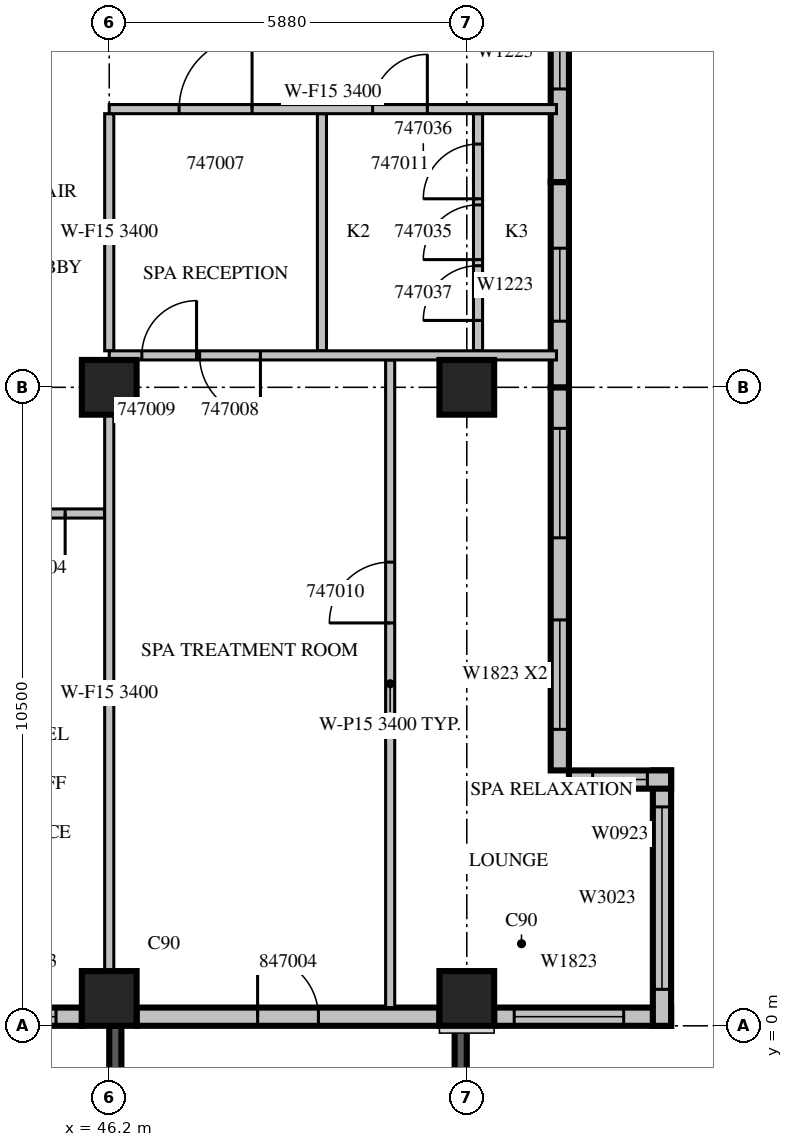
"""IFC4 building model, lengths in metres.
Left out: names, types, materials, properties, quantities, classifications, styles, units other than length and angle.
Written with IfcOpenShell. Run it as: python <this file> out.ifc"""

import sys

from ifc_helpers import new_model, si_unit, direction, frame, frame_2d, origin, origin_2d, place, context, subcontext, project, spatial, rectangle, extrude, source, transform, mapped, element, fill, save


model = new_model("IFC4")
c1 = context("Model", 3, precision=1e-05, world=origin(), true_north=direction((0.0, 1.0)))
c2 = subcontext(c1, "Body", "Model", "MODEL_VIEW")
j1 = project(units=[si_unit("LENGTHUNIT", "METRE"), si_unit("PLANEANGLEUNIT", "RADIAN")], contexts=[c1])
p1 = place(None, origin())
s1 = spatial("IfcSite", under=j1, at=p1, CompositionType="ELEMENT")
p2 = place(p1, origin())
s2 = spatial("IfcBuilding", under=s1, at=p2, CompositionType="ELEMENT")
p3 = place(p2, frame((0.0, 0.0, 212.0)))
s3 = spatial("IfcBuildingStorey", under=s2, at=p3, CompositionType="ELEMENT", Elevation=212.0)
m1 = source(origin(), c2, "Body", "SweptSolid", [
    extrude(rectangle(XDim=0.9, YDim=0.9, at=origin_2d()), origin(), (0.0, 0.0, 1.0), 3.8),
])
for number, where, z_axis, x_axis in (
    (1, (46.2, 0.45, 0.0), (0.0, 0.0, 1.0), (1.0, 0.0, 0.0)),
    (2, (52.08, 0.45, 0.0), (0.0, 0.0, 1.0), (1.0, 0.0, 0.0)),
    (3, (46.2, 10.5, 0.0), (0.0, 0.0, 1.0), (1.0, 0.0, 0.0)),
    (4, (52.08, 10.5, 0.0), (0.0, 0.0, 1.0), (1.0, 0.0, 0.0)),
):
    element("IfcColumn", number, at=place(p3, frame(where, z_axis=z_axis, x_axis=x_axis)), inside=s3, PredefinedType="COLUMN", context=c2, shape_type="MappedRepresentation", body=[
        mapped(m1, transform((0.0, 0.0, 0.0), scale=1.0)),
    ])
m2 = source(origin(), c2, "Body", "SweptSolid", [
    extrude(rectangle(XDim=1.75, YDim=0.3, at=frame_2d((0.875, 0.0))), origin(), (0.0, 0.0, 1.0), 3.4),
])
p4 = place(p3, frame((44.0, 0.15, 0.0), z_axis=(0.0, 0.0, 1.0), x_axis=(1.0, 0.0, 0.0)))
e5 = element("IfcWall", 5, at=p4, inside=s3, PredefinedType="STANDARD", context=c2, shape_type="MappedRepresentation", body=[
    mapped(m2, transform((0.0, 0.0, 0.0), scale=1.0)),
])
m3 = source(origin(), c2, "Body", "SweptSolid", [
    extrude(rectangle(XDim=0.9, YDim=2.3, at=frame_2d((0.45, 1.15))), frame((0.0, 0.16, 0.0), z_axis=(0.0, -1.0, 0.0), x_axis=(1.0, 0.0, 0.0)), (0.0, 0.0, 1.0), 0.32),
])
p5 = place(p4, frame((0.425, 0.0, 0.6)))
e6 = element("IfcOpeningElement", 6, at=p5, cuts=e5, PredefinedType="OPENING", context=c2, shape_type="MappedRepresentation", body=[
    mapped(m3, transform((0.0, 0.0, 0.0), scale=1.0)),
])
m4 = source(origin(), c2, "Body", "SweptSolid", [
    extrude(rectangle(XDim=4.98, YDim=0.3, at=frame_2d((2.49, 0.0))), origin(), (0.0, 0.0, 1.0), 3.4),
])
p6 = place(p3, frame((46.65, 0.15, 0.0), z_axis=(0.0, 0.0, 1.0), x_axis=(1.0, 0.0, 0.0)))
e7 = element("IfcWall", 7, at=p6, inside=s3, PredefinedType="STANDARD", context=c2, shape_type="MappedRepresentation", body=[
    mapped(m4, transform((0.0, 0.0, 0.0), scale=1.0)),
])
m5 = source(origin(), c2, "Body", "SweptSolid", [
    extrude(rectangle(XDim=1.0, YDim=2.1, at=frame_2d((0.5, 1.05))), frame((0.0, 0.16, 0.0), z_axis=(0.0, -1.0, 0.0), x_axis=(1.0, 0.0, 0.0)), (0.0, 0.0, 1.0), 0.32),
])
p7 = place(p6, frame((1.99, 0.0, 0.0)))
e8 = element("IfcOpeningElement", 8, at=p7, cuts=e7, PredefinedType="OPENING", context=c2, shape_type="MappedRepresentation", body=[
    mapped(m5, transform((0.0, 0.0, 0.0), scale=1.0)),
])
m6 = source(origin(), c2, "Body", "SweptSolid", [
    extrude(rectangle(XDim=2.91, YDim=0.3, at=frame_2d((1.455, 0.0))), origin(), (0.0, 0.0, 1.0), 3.4),
])
p8 = place(p3, frame((52.53, 0.15, 0.0), z_axis=(0.0, 0.0, 1.0), x_axis=(1.0, 0.0, 0.0)))
e9 = element("IfcWall", 9, at=p8, inside=s3, PredefinedType="STANDARD", context=c2, shape_type="MappedRepresentation", body=[
    mapped(m6, transform((0.0, 0.0, 0.0), scale=1.0)),
])
m7 = source(origin(), c2, "Body", "SweptSolid", [
    extrude(rectangle(XDim=1.8, YDim=2.3, at=frame_2d((0.9, 1.15))), frame((0.0, 0.16, 0.0), z_axis=(0.0, -1.0, 0.0), x_axis=(1.0, 0.0, 0.0)), (0.0, 0.0, 1.0), 0.32),
])
p9 = place(p8, frame((0.33, 0.0, 0.6)))
e10 = element("IfcOpeningElement", 10, at=p9, cuts=e9, PredefinedType="OPENING", context=c2, shape_type="MappedRepresentation", body=[
    mapped(m7, transform((0.0, 0.0, 0.0), scale=1.0)),
])
m8 = source(origin(), c2, "Body", "SweptSolid", [
    extrude(rectangle(XDim=4.2, YDim=0.3, at=frame_2d((2.1, 0.0))), origin(), (0.0, 0.0, 1.0), 3.4),
])
p10 = place(p3, frame((55.29, 0.0, 0.0), z_axis=(0.0, 0.0, 1.0), x_axis=(0.0, 1.0, 0.0)))
e11 = element("IfcWall", 11, at=p10, inside=s3, PredefinedType="STANDARD", context=c2, shape_type="MappedRepresentation", body=[
    mapped(m8, transform((0.0, 0.0, 0.0), scale=1.0)),
])
m9 = source(origin(), c2, "Body", "SweptSolid", [
    extrude(rectangle(XDim=3.0, YDim=2.3, at=frame_2d((1.5, 1.15))), frame((0.0, 0.16, 0.0), z_axis=(0.0, -1.0, 0.0), x_axis=(1.0, 0.0, 0.0)), (0.0, 0.0, 1.0), 0.32),
])
p11 = place(p10, frame((0.6, 0.0, 0.6)))
e12 = element("IfcOpeningElement", 12, at=p11, cuts=e11, PredefinedType="OPENING", context=c2, shape_type="MappedRepresentation", body=[
    mapped(m9, transform((0.0, 0.0, 0.0), scale=1.0)),
])
m10 = source(origin(), c2, "Body", "SweptSolid", [
    extrude(rectangle(XDim=1.68, YDim=0.3, at=frame_2d((0.84, 0.0))), origin(), (0.0, 0.0, 1.0), 3.4),
])
p12 = place(p3, frame((55.44, 4.05, 0.0), z_axis=(0.0, 0.0, 1.0), x_axis=(-1.0, 0.0, 0.0)))
e13 = element("IfcWall", 13, at=p12, inside=s3, PredefinedType="STANDARD", context=c2, shape_type="MappedRepresentation", body=[
    mapped(m10, transform((0.0, 0.0, 0.0), scale=1.0)),
])
p13 = place(p12, frame((0.39, 0.0, 0.6)))
e14 = element("IfcOpeningElement", 14, at=p13, cuts=e13, PredefinedType="OPENING", context=c2, shape_type="MappedRepresentation", body=[
    mapped(m3, transform((0.0, 0.0, 0.0), scale=1.0)),
])
m11 = source(origin(), c2, "Body", "SweptSolid", [
    extrude(rectangle(XDim=6.3, YDim=0.3, at=frame_2d((3.15, 0.0))), origin(), (0.0, 0.0, 1.0), 3.4),
])
p14 = place(p3, frame((53.61, 4.2, 0.0), z_axis=(0.0, 0.0, 1.0), x_axis=(0.0, 1.0, 0.0)))
e15 = element("IfcWall", 15, at=p14, inside=s3, PredefinedType="STANDARD", context=c2, shape_type="MappedRepresentation", body=[
    mapped(m11, transform((0.0, 0.0, 0.0), scale=1.0)),
])
p15 = place(p14, frame((0.675, 0.0, 0.6)))
e16 = element("IfcOpeningElement", 16, at=p15, cuts=e15, PredefinedType="OPENING", context=c2, shape_type="MappedRepresentation", body=[
    mapped(m7, transform((0.0, 0.0, 0.0), scale=1.0)),
])
p16 = place(p14, frame((3.825, 0.0, 0.6)))
e17 = element("IfcOpeningElement", 17, at=p16, cuts=e15, PredefinedType="OPENING", context=c2, shape_type="MappedRepresentation", body=[
    mapped(m7, transform((0.0, 0.0, 0.0), scale=1.0)),
])
m12 = source(origin(), c2, "Body", "SweptSolid", [
    extrude(rectangle(XDim=3.375, YDim=0.3, at=frame_2d((1.688, 0.0))), origin(), (0.0, 0.0, 1.0), 3.4),
])
p17 = place(p3, frame((53.61, 10.5, 0.0), z_axis=(0.0, 0.0, 1.0), x_axis=(0.0, 1.0, 0.0)))
e18 = element("IfcWall", 18, at=p17, inside=s3, PredefinedType="STANDARD", context=c2, shape_type="MappedRepresentation", body=[
    mapped(m12, transform((0.0, 0.0, 0.0), scale=1.0)),
])
m13 = source(origin(), c2, "Body", "SweptSolid", [
    extrude(rectangle(XDim=1.2, YDim=2.3, at=frame_2d((0.6, 1.15))), frame((0.0, 0.16, 0.0), z_axis=(0.0, -1.0, 0.0), x_axis=(1.0, 0.0, 0.0)), (0.0, 0.0, 1.0), 0.32),
])
p18 = place(p17, frame((1.087, 0.0, 0.6)))
e19 = element("IfcOpeningElement", 19, at=p18, cuts=e18, PredefinedType="OPENING", context=c2, shape_type="MappedRepresentation", body=[
    mapped(m13, transform((0.0, 0.0, 0.0), scale=1.0)),
])
p19 = place(p3, frame((53.61, 13.875, 0.0), z_axis=(0.0, 0.0, 1.0), x_axis=(0.0, 1.0, 0.0)))
e20 = element("IfcWall", 20, at=p19, inside=s3, PredefinedType="STANDARD", context=c2, shape_type="MappedRepresentation", body=[
    mapped(m12, transform((0.0, 0.0, 0.0), scale=1.0)),
])
p20 = place(p19, frame((1.531, 0.0, 0.6)))
e21 = element("IfcOpeningElement", 21, at=p20, cuts=e20, PredefinedType="OPENING", context=c2, shape_type="MappedRepresentation", body=[
    mapped(m13, transform((0.0, 0.0, 0.0), scale=1.0)),
])
m14 = source(origin(), c2, "Body", "SweptSolid", [
    extrude(rectangle(XDim=3.9, YDim=0.2, at=frame_2d((1.95, 0.0))), origin(), (0.0, 0.0, 1.0), 3.39),
])
p21 = place(p3, frame((46.3, 0.0, 0.0), z_axis=(0.0, 0.0, 1.0), x_axis=(0.0, -1.0, 0.0)))
e22 = element("IfcWall", 22, at=p21, inside=s3, PredefinedType="SOLIDWALL", context=c2, shape_type="MappedRepresentation", body=[
    mapped(m14, transform((0.0, 0.0, 0.0), scale=1.0)),
])
m15 = source(origin(), c2, "Body", "SweptSolid", [
    extrude(rectangle(XDim=2.4, YDim=2.3, at=frame_2d((1.2, 1.15))), frame((0.0, 0.11, 0.0), z_axis=(0.0, -1.0, 0.0), x_axis=(1.0, 0.0, 0.0)), (0.0, 0.0, 1.0), 0.22),
])
p22 = place(p21, frame((0.75, 0.0, 0.6)))
e23 = element("IfcOpeningElement", 23, at=p22, cuts=e22, PredefinedType="OPENING", context=c2, shape_type="MappedRepresentation", body=[
    mapped(m15, transform((0.0, 0.0, 0.0), scale=1.0)),
])
p23 = place(p3, frame((51.98, 0.0, 0.0), z_axis=(0.0, 0.0, 1.0), x_axis=(0.0, -1.0, 0.0)))
e24 = element("IfcWall", 24, at=p23, inside=s3, PredefinedType="SOLIDWALL", context=c2, shape_type="MappedRepresentation", body=[
    mapped(m14, transform((0.0, 0.0, 0.0), scale=1.0)),
])
p24 = place(p23, frame((0.75, 0.0, 0.6)))
e25 = element("IfcOpeningElement", 25, at=p24, cuts=e24, PredefinedType="OPENING", context=c2, shape_type="MappedRepresentation", body=[
    mapped(m15, transform((0.0, 0.0, 0.0), scale=1.0)),
])
m16 = source(origin(), c2, "Body", "SweptSolid", [
    extrude(rectangle(XDim=2.2, YDim=0.15, at=frame_2d((1.1, 0.0))), origin(), (0.0, 0.0, 1.0), 3.4),
])
p25 = place(p3, frame((46.125, 8.425, 0.0), z_axis=(0.0, 0.0, 1.0), x_axis=(-1.0, 0.0, 0.0)))
e26 = element("IfcWall", 26, at=p25, inside=s3, PredefinedType="PARTITIONING", context=c2, shape_type="MappedRepresentation", body=[
    mapped(m16, transform((0.0, 0.0, 0.0), scale=1.0)),
])
m17 = source(origin(), c2, "Body", "SweptSolid", [
    extrude(rectangle(XDim=0.9, YDim=2.1, at=frame_2d((0.45, 1.05))), frame((0.0, 0.085, 0.0), z_axis=(0.0, -1.0, 0.0), x_axis=(1.0, 0.0, 0.0)), (0.0, 0.0, 1.0), 0.17),
])
p26 = place(p25, frame((0.65, 0.0, 0.0)))
e27 = element("IfcOpeningElement", 27, at=p26, cuts=e26, PredefinedType="OPENING", context=c2, shape_type="MappedRepresentation", body=[
    mapped(m17, transform((0.0, 0.0, 0.0), scale=1.0)),
])
m18 = source(origin(), c2, "Body", "SweptSolid", [
    extrude(rectangle(XDim=10.65, YDim=0.15, at=frame_2d((5.325, 0.0))), origin(), (0.0, 0.0, 1.0), 3.4),
])
p27 = place(p3, frame((50.82, 0.3, 0.0), z_axis=(0.0, 0.0, 1.0), x_axis=(0.0, 1.0, 0.0)))
e28 = element("IfcWall", 28, at=p27, inside=s3, PredefinedType="PARTITIONING", context=c2, shape_type="MappedRepresentation", body=[
    mapped(m18, transform((0.0, 0.0, 0.0), scale=1.0)),
])
m19 = source(origin(), c2, "Body", "SweptSolid", [
    extrude(rectangle(XDim=1.0, YDim=2.1, at=frame_2d((0.5, 1.05))), frame((0.0, 0.085, 0.0), z_axis=(0.0, -1.0, 0.0), x_axis=(1.0, 0.0, 0.0)), (0.0, 0.0, 1.0), 0.17),
])
p28 = place(p27, frame((6.325, 0.0, 0.0)))
e29 = element("IfcOpeningElement", 29, at=p28, cuts=e28, PredefinedType="OPENING", context=c2, shape_type="MappedRepresentation", body=[
    mapped(m19, transform((0.0, 0.0, 0.0), scale=1.0)),
])
m20 = source(origin(), c2, "Body", "SweptSolid", [
    extrude(rectangle(XDim=3.9, YDim=0.15, at=frame_2d((1.95, 0.0))), origin(), (0.0, 0.0, 1.0), 3.4),
])
p29 = place(p3, frame((49.698, 11.1, 0.0), z_axis=(0.0, 0.0, 1.0), x_axis=(0.0, 1.0, 0.0)))
e30 = element("IfcWall", 30, at=p29, inside=s3, PredefinedType="PARTITIONING", context=c2, shape_type="MappedRepresentation", body=[
    mapped(m20, transform((0.0, 0.0, 0.0), scale=1.0)),
])
p30 = place(p3, frame((52.265, 11.1, 0.0), z_axis=(0.0, 0.0, 1.0), x_axis=(0.0, 1.0, 0.0)))
e31 = element("IfcWall", 31, at=p30, inside=s3, PredefinedType="PARTITIONING", context=c2, shape_type="MappedRepresentation", body=[
    mapped(m20, transform((0.0, 0.0, 0.0), scale=1.0)),
])
p31 = place(p30, frame((1.5, 0.0, 0.0)))
e32 = element("IfcOpeningElement", 32, at=p31, cuts=e31, PredefinedType="OPENING", context=c2, shape_type="MappedRepresentation", body=[
    mapped(m17, transform((0.0, 0.0, 0.0), scale=1.0)),
])
p32 = place(p30, frame((2.5, 0.0, 0.0)))
e33 = element("IfcOpeningElement", 33, at=p32, cuts=e31, PredefinedType="OPENING", context=c2, shape_type="MappedRepresentation", body=[
    mapped(m17, transform((0.0, 0.0, 0.0), scale=1.0)),
])
p33 = place(p30, frame((0.5, 0.0, 0.0)))
e34 = element("IfcOpeningElement", 34, at=p33, cuts=e31, PredefinedType="OPENING", context=c2, shape_type="MappedRepresentation", body=[
    mapped(m17, transform((0.0, 0.0, 0.0), scale=1.0)),
])
m21 = source(origin(), c2, "Body", "SweptSolid", [
    extrude(rectangle(XDim=9.152, YDim=0.15, at=frame_2d((4.576, 0.0))), origin(), (0.0, 0.0, 1.0), 3.4),
])
p34 = place(p3, frame((46.2, 0.899, 0.0), z_axis=(0.0, 0.0, 1.0), x_axis=(0.0, 1.0, 0.0)))
e35 = element("IfcWall", 35, at=p34, inside=s3, PredefinedType="PARTITIONING", context=c2, shape_type="MappedRepresentation", body=[
    mapped(m21, transform((0.0, 0.0, 0.0), scale=1.0)),
])
p35 = place(p3, frame((46.2, 11.1, 0.0), z_axis=(0.0, 0.0, 1.0), x_axis=(0.0, 1.0, 0.0)))
e36 = element("IfcWall", 36, at=p35, inside=s3, PredefinedType="PARTITIONING", context=c2, shape_type="MappedRepresentation", body=[
    mapped(m20, transform((0.0, 0.0, 0.0), scale=1.0)),
])
m22 = source(origin(), c2, "Body", "SweptSolid", [
    extrude(rectangle(XDim=7.355, YDim=0.15, at=frame_2d((3.678, 0.0))), origin(), (0.0, 0.0, 1.0), 3.4),
])
p36 = place(p3, frame((53.555, 11.025, 0.0), z_axis=(0.0, 0.0, 1.0), x_axis=(-1.0, 0.0, 0.0)))
e37 = element("IfcWall", 37, at=p36, inside=s3, PredefinedType="PARTITIONING", context=c2, shape_type="MappedRepresentation", body=[
    mapped(m22, transform((0.0, 0.0, 0.0), scale=1.0)),
])
p37 = place(p36, frame((4.869, 0.0, 0.0)))
e38 = element("IfcOpeningElement", 38, at=p37, cuts=e37, PredefinedType="OPENING", context=c2, shape_type="MappedRepresentation", body=[
    mapped(m19, transform((0.0, 0.0, 0.0), scale=1.0)),
])
p38 = place(p36, frame((5.919, 0.0, 0.0)))
e39 = element("IfcOpeningElement", 39, at=p38, cuts=e37, PredefinedType="OPENING", context=c2, shape_type="MappedRepresentation", body=[
    mapped(m17, transform((0.0, 0.0, 0.0), scale=1.0)),
])
p39 = place(p3, frame((53.555, 15.075, 0.0), z_axis=(0.0, 0.0, 1.0), x_axis=(-1.0, 0.0, 0.0)))
e40 = element("IfcWall", 40, at=p39, inside=s3, PredefinedType="PARTITIONING", context=c2, shape_type="MappedRepresentation", body=[
    mapped(m22, transform((0.0, 0.0, 0.0), scale=1.0)),
])
m23 = source(origin(), c2, "Body", "SweptSolid", [
    extrude(rectangle(XDim=1.2, YDim=2.1, at=frame_2d((0.6, 1.05))), frame((0.0, 0.085, 0.0), z_axis=(0.0, -1.0, 0.0), x_axis=(1.0, 0.0, 0.0)), (0.0, 0.0, 1.0), 0.17),
])
p40 = place(p39, frame((5.006, 0.0, 0.0)))
e41 = element("IfcOpeningElement", 41, at=p40, cuts=e40, PredefinedType="OPENING", context=c2, shape_type="MappedRepresentation", body=[
    mapped(m23, transform((0.0, 0.0, 0.0), scale=1.0)),
])
p41 = place(p39, frame((2.124, 0.0, 0.0)))
e42 = element("IfcOpeningElement", 42, at=p41, cuts=e40, PredefinedType="OPENING", context=c2, shape_type="MappedRepresentation", body=[
    mapped(m17, transform((0.0, 0.0, 0.0), scale=1.0)),
])
m24 = source(origin(), c2, "Body", "SweptSolid", [
    extrude(rectangle(XDim=0.9, YDim=2.3, at=frame_2d((0.45, 1.15))), frame((0.0, 0.03, 0.0), z_axis=(0.0, -1.0, 0.0), x_axis=(1.0, 0.0, 0.0)), (0.0, 0.0, 1.0), 0.06),
])
p42 = place(p5, origin())
e43 = element("IfcWindow", 43, at=p42, inside=s3, PartitioningType="SINGLE_PANEL", PredefinedType="WINDOW", context=c2, shape_type="MappedRepresentation", body=[
    mapped(m24, transform((0.0, 0.0, 0.0), scale=1.0)),
])
fill(e6, e43)
m25 = source(origin(), c2, "Body", "SweptSolid", [
    extrude(rectangle(XDim=1.8, YDim=2.3, at=frame_2d((0.9, 1.15))), frame((0.0, 0.03, 0.0), z_axis=(0.0, -1.0, 0.0), x_axis=(1.0, 0.0, 0.0)), (0.0, 0.0, 1.0), 0.06),
])
p43 = place(p9, origin())
e44 = element("IfcWindow", 44, at=p43, inside=s3, PartitioningType="SINGLE_PANEL", PredefinedType="WINDOW", context=c2, shape_type="MappedRepresentation", body=[
    mapped(m25, transform((0.0, 0.0, 0.0), scale=1.0)),
])
fill(e10, e44)
m26 = source(origin(), c2, "Body", "SweptSolid", [
    extrude(rectangle(XDim=3.0, YDim=2.3, at=frame_2d((1.5, 1.15))), frame((0.0, 0.03, 0.0), z_axis=(0.0, -1.0, 0.0), x_axis=(1.0, 0.0, 0.0)), (0.0, 0.0, 1.0), 0.06),
])
p44 = place(p11, origin())
e45 = element("IfcWindow", 45, at=p44, inside=s3, PartitioningType="SINGLE_PANEL", PredefinedType="WINDOW", context=c2, shape_type="MappedRepresentation", body=[
    mapped(m26, transform((0.0, 0.0, 0.0), scale=1.0)),
])
fill(e12, e45)
p45 = place(p13, origin())
e46 = element("IfcWindow", 46, at=p45, inside=s3, PartitioningType="SINGLE_PANEL", PredefinedType="WINDOW", context=c2, shape_type="MappedRepresentation", body=[
    mapped(m24, transform((0.0, 0.0, 0.0), scale=1.0)),
])
fill(e14, e46)
p46 = place(p15, origin())
e47 = element("IfcWindow", 47, at=p46, inside=s3, PartitioningType="SINGLE_PANEL", PredefinedType="WINDOW", context=c2, shape_type="MappedRepresentation", body=[
    mapped(m25, transform((0.0, 0.0, 0.0), scale=1.0)),
])
fill(e16, e47)
p47 = place(p16, origin())
e48 = element("IfcWindow", 48, at=p47, inside=s3, PartitioningType="SINGLE_PANEL", PredefinedType="WINDOW", context=c2, shape_type="MappedRepresentation", body=[
    mapped(m25, transform((0.0, 0.0, 0.0), scale=1.0)),
])
fill(e17, e48)
m27 = source(origin(), c2, "Body", "SweptSolid", [
    extrude(rectangle(XDim=1.2, YDim=2.3, at=frame_2d((0.6, 1.15))), frame((0.0, 0.03, 0.0), z_axis=(0.0, -1.0, 0.0), x_axis=(1.0, 0.0, 0.0)), (0.0, 0.0, 1.0), 0.06),
])
p48 = place(p18, origin())
e49 = element("IfcWindow", 49, at=p48, inside=s3, PartitioningType="SINGLE_PANEL", PredefinedType="WINDOW", context=c2, shape_type="MappedRepresentation", body=[
    mapped(m27, transform((0.0, 0.0, 0.0), scale=1.0)),
])
fill(e19, e49)
p49 = place(p20, origin())
e50 = element("IfcWindow", 50, at=p49, inside=s3, PartitioningType="SINGLE_PANEL", PredefinedType="WINDOW", context=c2, shape_type="MappedRepresentation", body=[
    mapped(m27, transform((0.0, 0.0, 0.0), scale=1.0)),
])
fill(e21, e50)
m28 = source(origin(), c2, "Body", "SweptSolid", [
    extrude(rectangle(XDim=0.9, YDim=2.1, at=frame_2d((0.45, 1.05))), frame((0.0, 0.025, 0.0), z_axis=(0.0, -1.0, 0.0), x_axis=(1.0, 0.0, 0.0)), (0.0, 0.0, 1.0), 0.05),
])
p50 = place(p26, origin())
e51 = element("IfcDoor", 51, at=p50, inside=s3, OperationType="SINGLE_SWING_LEFT", PredefinedType="DOOR", context=c2, shape_type="MappedRepresentation", body=[
    mapped(m28, transform((0.0, 0.0, 0.0), scale=1.0)),
])
fill(e27, e51)
m29 = source(origin(), c2, "Body", "SweptSolid", [
    extrude(rectangle(XDim=1.2, YDim=2.1, at=frame_2d((0.6, 1.05))), frame((0.0, 0.025, 0.0), z_axis=(0.0, -1.0, 0.0), x_axis=(1.0, 0.0, 0.0)), (0.0, 0.0, 1.0), 0.05),
])
p51 = place(p40, origin())
e52 = element("IfcDoor", 52, at=p51, inside=s3, OperationType="SINGLE_SWING_RIGHT", PredefinedType="DOOR", context=c2, shape_type="MappedRepresentation", body=[
    mapped(m29, transform((0.0, 0.0, 0.0), scale=1.0)),
])
fill(e41, e52)
m30 = source(origin(), c2, "Body", "SweptSolid", [
    extrude(rectangle(XDim=1.0, YDim=2.1, at=frame_2d((0.5, 1.05))), frame((0.0, 0.025, 0.0), z_axis=(0.0, -1.0, 0.0), x_axis=(1.0, 0.0, 0.0)), (0.0, 0.0, 1.0), 0.05),
])
p52 = place(p37, origin())
e53 = element("IfcDoor", 53, at=p52, inside=s3, OperationType="SINGLE_SWING_LEFT", PredefinedType="DOOR", context=c2, shape_type="MappedRepresentation", body=[
    mapped(m30, transform((0.0, 0.0, 0.0), scale=1.0)),
])
fill(e38, e53)
p53 = place(p38, origin())
e54 = element("IfcDoor", 54, at=p53, inside=s3, OperationType="SINGLE_SWING_RIGHT", PredefinedType="DOOR", context=c2, shape_type="MappedRepresentation", body=[
    mapped(m28, transform((0.0, 0.0, 0.0), scale=1.0)),
])
fill(e39, e54)
p54 = place(p28, origin())
e55 = element("IfcDoor", 55, at=p54, inside=s3, OperationType="SINGLE_SWING_LEFT", PredefinedType="DOOR", context=c2, shape_type="MappedRepresentation", body=[
    mapped(m30, transform((0.0, 0.0, 0.0), scale=1.0)),
])
fill(e29, e55)
p55 = place(p41, origin())
e56 = element("IfcDoor", 56, at=p55, inside=s3, OperationType="SINGLE_SWING_RIGHT", PredefinedType="DOOR", context=c2, shape_type="MappedRepresentation", body=[
    mapped(m28, transform((0.0, 0.0, 0.0), scale=1.0)),
])
fill(e42, e56)
p56 = place(p31, origin())
e57 = element("IfcDoor", 57, at=p56, inside=s3, OperationType="SINGLE_SWING_LEFT", PredefinedType="DOOR", context=c2, shape_type="MappedRepresentation", body=[
    mapped(m28, transform((0.0, 0.0, 0.0), scale=1.0)),
])
fill(e32, e57)
p57 = place(p32, origin())
e58 = element("IfcDoor", 58, at=p57, inside=s3, OperationType="SINGLE_SWING_LEFT", PredefinedType="DOOR", context=c2, shape_type="MappedRepresentation", body=[
    mapped(m28, transform((0.0, 0.0, 0.0), scale=1.0)),
])
fill(e33, e58)
p58 = place(p33, origin())
e59 = element("IfcDoor", 59, at=p58, inside=s3, OperationType="SINGLE_SWING_LEFT", PredefinedType="DOOR", context=c2, shape_type="MappedRepresentation", body=[
    mapped(m28, transform((0.0, 0.0, 0.0), scale=1.0)),
])
fill(e34, e59)
p59 = place(p7, origin())
e60 = element("IfcDoor", 60, at=p59, inside=s3, OperationType="SINGLE_SWING_LEFT", PredefinedType="DOOR", context=c2, shape_type="MappedRepresentation", body=[
    mapped(m30, transform((0.0, 0.0, 0.0), scale=1.0)),
])
fill(e8, e60)
save(model, sys.argv[1])
